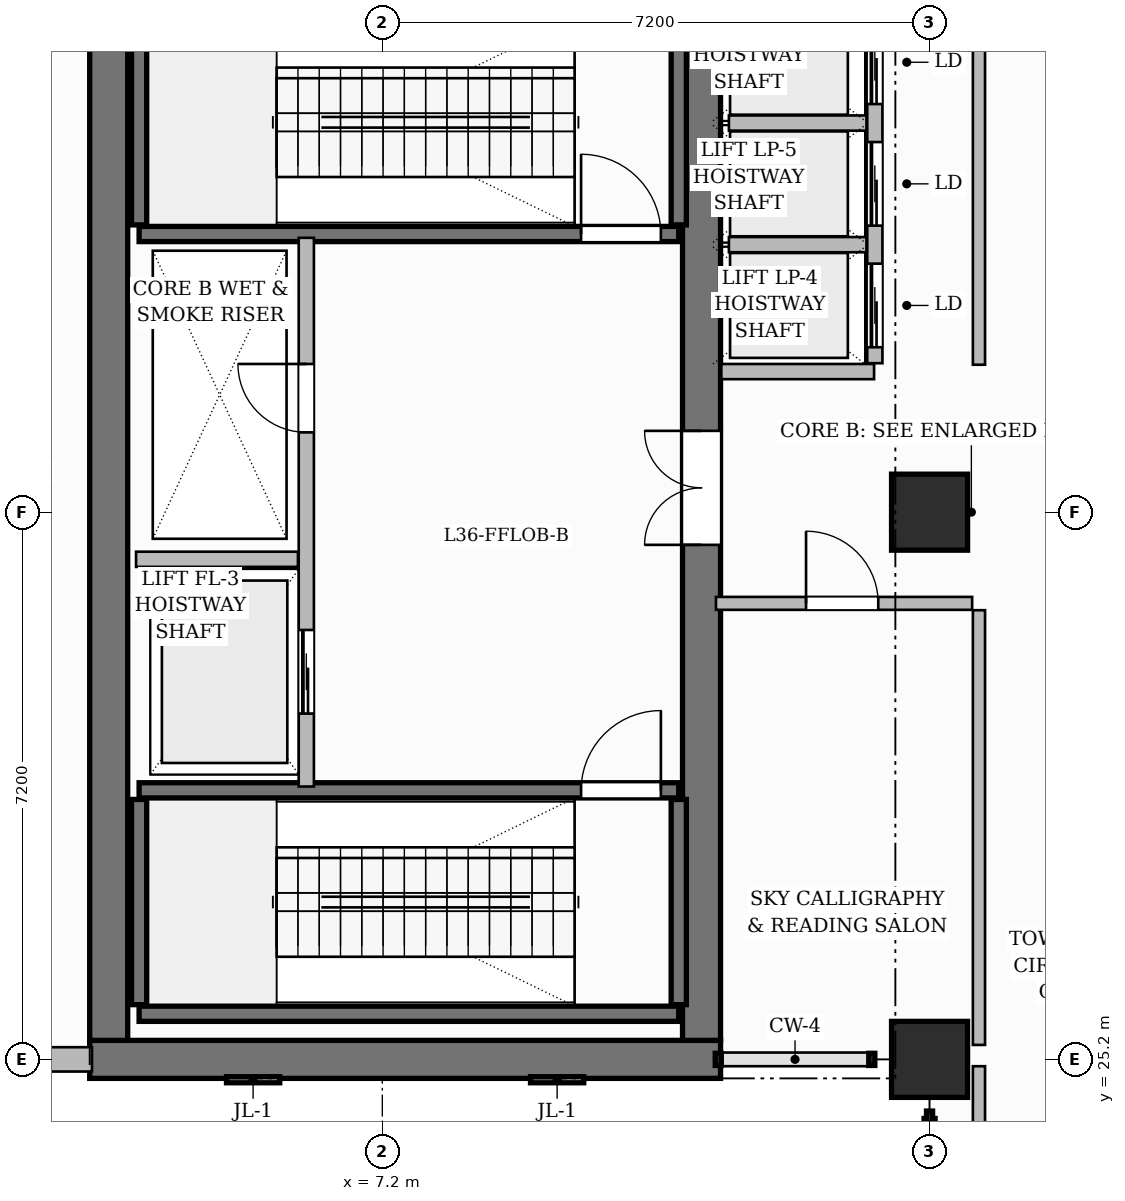
"""IFC4 building model, lengths in metres.
Left out: names, types, materials, properties, quantities, classifications, styles, units other than length and angle.
Written with IfcOpenShell. Run it as: python <this file> out.ifc"""

import sys

from ifc_helpers import new_model, si_unit, direction, frame, frame_2d, origin, origin_2d, place, context, subcontext, project, spatial, rectangle, extrude, source, transform, mapped, element, fill, save


model = new_model("IFC4")
c1 = context("Model", 3, precision=1e-05, world=origin(), true_north=direction((0.0, 1.0)))
c2 = subcontext(c1, "Body", "Model", "MODEL_VIEW")
j1 = project(units=[si_unit("LENGTHUNIT", "METRE"), si_unit("PLANEANGLEUNIT", "RADIAN")], contexts=[c1])
p1 = place(None, origin())
s1 = spatial("IfcSite", under=j1, at=p1, CompositionType="ELEMENT")
p2 = place(p1, origin())
s2 = spatial("IfcBuilding", under=s1, at=p2, CompositionType="ELEMENT")
p3 = place(p2, frame((0.0, 0.0, 145.1)))
s3 = spatial("IfcBuildingStorey", under=s2, at=p3, CompositionType="ELEMENT", Elevation=145.1)
p4 = place(p3, frame((3.35, 25.2, 0.0), z_axis=(0.0, 0.0, 1.0), x_axis=(1.0, 0.0, 0.0)))
e1 = element("IfcWall", 1, at=p4, inside=s3, PredefinedType="SHEAR", context=c2, shape_type="SweptSolid", body=[
    extrude(rectangle(XDim=8.3, YDim=0.5, at=frame_2d((4.15, 0.0))), origin(), (0.0, 0.0, 1.0), 5.2),
])
p5 = place(p3, frame((3.6, 25.45, 0.0), z_axis=(0.0, 0.0, 1.0), x_axis=(0.0, 1.0, 0.0)))
e2 = element("IfcWall", 2, at=p5, inside=s3, PredefinedType="SHEAR", context=c2, shape_type="SweptSolid", body=[
    extrude(rectangle(XDim=13.9, YDim=0.5, at=frame_2d((6.95, 0.0))), origin(), (0.0, 0.0, 1.0), 5.2),
])
p6 = place(p3, frame((11.4, 25.45, 0.0), z_axis=(0.0, 0.0, 1.0), x_axis=(0.0, 1.0, 0.0)))
e3 = element("IfcWall", 3, at=p6, inside=s3, PredefinedType="SHEAR", context=c2, shape_type="SweptSolid", body=[
    extrude(rectangle(XDim=13.9, YDim=0.5, at=frame_2d((6.95, 0.0))), origin(), (0.0, 0.0, 1.0), 5.2),
])
p7 = place(p6, frame((6.52, 0.0, 0.0)))
e4 = element("IfcOpeningElement", 4, at=p7, cuts=e3, PredefinedType="OPENING", context=c2, shape_type="SweptSolid", body=[
    extrude(rectangle(XDim=1.5, YDim=2.2, at=frame_2d((0.75, 1.1))), frame((0.0, 0.26, 0.0), z_axis=(0.0, -1.0, 0.0), x_axis=(1.0, 0.0, 0.0)), (0.0, 0.0, 1.0), 0.52),
])
m1 = source(origin(), c2, "Body", "SweptSolid", [
    extrude(rectangle(XDim=1.0, YDim=1.0, at=origin_2d()), origin(), (0.0, 0.0, 1.0), 5.2),
])
for number, where, z_axis, x_axis in (
    (5, (14.4, 25.2, 0.0), (0.0, 0.0, 1.0), (1.0, 0.0, 0.0)),
    (6, (14.4, 32.4, 0.0), (0.0, 0.0, 1.0), (1.0, 0.0, 0.0)),
):
    element("IfcColumn", number, at=place(p3, frame(where, z_axis=z_axis, x_axis=x_axis)), inside=s3, PredefinedType="COLUMN", context=c2, shape_type="MappedRepresentation", body=[
        mapped(m1, transform((0.0, 0.0, 0.0), scale=1.0)),
    ])
p8 = place(p3, frame((4.0, 25.8, 0.0), z_axis=(0.0, 0.0, 1.0), x_axis=(1.0, 0.0, 0.0)))
e7 = element("IfcWall", 7, at=p8, inside=s3, PredefinedType="SHEAR", context=c2, shape_type="SweptSolid", body=[
    extrude(rectangle(XDim=7.1, YDim=0.2, at=frame_2d((3.55, 0.0))), origin(), (0.0, 0.0, 1.0), 5.2),
])
for number, where, z_axis, x_axis in (
    (8, (4.0, 25.92, 0.0), (0.0, 0.0, 1.0), (0.0, 1.0, 0.0)),
    (9, (11.1, 25.92, 0.0), (0.0, 0.0, 1.0), (0.0, 1.0, 0.0)),
):
    element("IfcWall", number, at=place(p3, frame(where, z_axis=z_axis, x_axis=x_axis)), inside=s3, PredefinedType="SHEAR", context=c2, shape_type="SweptSolid", body=[
        extrude(rectangle(XDim=2.7, YDim=0.2, at=frame_2d((1.35, 0.0))), origin(), (0.0, 0.0, 1.0), 5.2),
    ])
p9 = place(p3, frame((4.0, 28.74, 0.0), z_axis=(0.0, 0.0, 1.0), x_axis=(1.0, 0.0, 0.0)))
e10 = element("IfcWall", 10, at=p9, inside=s3, PredefinedType="SHEAR", context=c2, shape_type="SweptSolid", body=[
    extrude(rectangle(XDim=7.1, YDim=0.2, at=frame_2d((3.55, 0.0))), origin(), (0.0, 0.0, 1.0), 5.2),
])
p10 = place(p9, frame((5.815, 0.0, 0.0)))
e11 = element("IfcOpeningElement", 11, at=p10, cuts=e10, PredefinedType="OPENING", context=c2, shape_type="SweptSolid", body=[
    extrude(rectangle(XDim=1.05, YDim=2.2, at=frame_2d((0.525, 1.1))), frame((0.0, 0.11, 0.0), z_axis=(0.0, -1.0, 0.0), x_axis=(1.0, 0.0, 0.0)), (0.0, 0.0, 1.0), 0.22),
])
for number, where, z_axis, x_axis in (
    (12, (4.0, 36.18, 0.0), (0.0, 0.0, 1.0), (0.0, 1.0, 0.0)),
    (13, (11.1, 36.18, 0.0), (0.0, 0.0, 1.0), (0.0, 1.0, 0.0)),
):
    element("IfcWall", number, at=place(p3, frame(where, z_axis=z_axis, x_axis=x_axis)), inside=s3, PredefinedType="SHEAR", context=c2, shape_type="SweptSolid", body=[
        extrude(rectangle(XDim=2.7, YDim=0.2, at=frame_2d((1.35, 0.0))), origin(), (0.0, 0.0, 1.0), 5.2),
    ])
p11 = place(p3, frame((4.0, 36.06, 0.0), z_axis=(0.0, 0.0, 1.0), x_axis=(1.0, 0.0, 0.0)))
e14 = element("IfcWall", 14, at=p11, inside=s3, PredefinedType="SHEAR", context=c2, shape_type="SweptSolid", body=[
    extrude(rectangle(XDim=7.1, YDim=0.2, at=frame_2d((3.55, 0.0))), origin(), (0.0, 0.0, 1.0), 5.2),
])
p12 = place(p11, frame((5.815, 0.0, 0.0)))
e15 = element("IfcOpeningElement", 15, at=p12, cuts=e14, PredefinedType="OPENING", context=c2, shape_type="SweptSolid", body=[
    extrude(rectangle(XDim=1.05, YDim=2.2, at=frame_2d((0.525, 1.1))), frame((0.0, 0.11, 0.0), z_axis=(0.0, -1.0, 0.0), x_axis=(1.0, 0.0, 0.0)), (0.0, 0.0, 1.0), 0.22),
])
p13 = place(p3, frame((6.2, 28.79, 0.0), z_axis=(0.0, 0.0, 1.0), x_axis=(0.0, 1.0, 0.0)))
e16 = element("IfcWall", 16, at=p13, inside=s3, PredefinedType="PARTITIONING", context=c2, shape_type="SweptSolid", body=[
    extrude(rectangle(XDim=7.22, YDim=0.2, at=frame_2d((3.61, 0.0))), origin(), (0.0, 0.0, 1.0), 4.95),
])
p14 = place(p13, frame((4.66, 0.0, 0.0)))
e17 = element("IfcOpeningElement", 17, at=p14, cuts=e16, PredefinedType="OPENING", context=c2, shape_type="SweptSolid", body=[
    extrude(rectangle(XDim=0.9, YDim=2.1, at=frame_2d((0.45, 1.05))), frame((0.0, 0.11, 0.0), z_axis=(0.0, -1.0, 0.0), x_axis=(1.0, 0.0, 0.0)), (0.0, 0.0, 1.0), 0.22),
])
p15 = place(p13, frame((0.96, 0.0, 0.0)))
e18 = element("IfcOpeningElement", 18, at=p15, cuts=e16, PredefinedType="OPENING", context=c2, shape_type="SweptSolid", body=[
    extrude(rectangle(XDim=1.1, YDim=2.2, at=frame_2d((0.55, 1.1))), frame((0.0, 0.11, 0.0), z_axis=(0.0, -1.0, 0.0), x_axis=(1.0, 0.0, 0.0)), (0.0, 0.0, 1.0), 0.22),
])
p16 = place(p3, frame((3.96, 31.78, 0.0), z_axis=(0.0, 0.0, 1.0), x_axis=(1.0, 0.0, 0.0)))
e19 = element("IfcWall", 19, at=p16, inside=s3, PredefinedType="PARTITIONING", context=c2, shape_type="SweptSolid", body=[
    extrude(rectangle(XDim=2.13, YDim=0.2, at=frame_2d((1.065, 0.0))), origin(), (0.0, 0.0, 1.0), 4.95),
])
p17 = place(p3, frame((11.66, 34.25, 0.0), z_axis=(0.0, 0.0, 1.0), x_axis=(1.0, 0.0, 0.0)))
e20 = element("IfcWall", 20, at=p17, inside=s3, PredefinedType="PARTITIONING", context=c2, shape_type="SweptSolid", body=[
    extrude(rectangle(XDim=2.01, YDim=0.2, at=frame_2d((1.005, 0.0))), origin(), (0.0, 0.0, 1.0), 4.95),
])
p18 = place(p3, frame((13.68, 34.36, 0.0), z_axis=(0.0, 0.0, 1.0), x_axis=(0.0, 1.0, 0.0)))
e21 = element("IfcWall", 21, at=p18, inside=s3, PredefinedType="PARTITIONING", context=c2, shape_type="SweptSolid", body=[
    extrude(rectangle(XDim=4.72, YDim=0.2, at=frame_2d((2.36, 0.0))), origin(), (0.0, 0.0, 1.0), 4.95),
])
p19 = place(p18, frame((0.21, 0.0, 0.0)))
e22 = element("IfcOpeningElement", 22, at=p19, cuts=e21, PredefinedType="OPENING", context=c2, shape_type="SweptSolid", body=[
    extrude(rectangle(XDim=1.1, YDim=2.2, at=frame_2d((0.55, 1.1))), frame((0.0, 0.11, 0.0), z_axis=(0.0, -1.0, 0.0), x_axis=(1.0, 0.0, 0.0)), (0.0, 0.0, 1.0), 0.22),
])
p20 = place(p18, frame((1.81, 0.0, 0.0)))
e23 = element("IfcOpeningElement", 23, at=p20, cuts=e21, PredefinedType="OPENING", context=c2, shape_type="SweptSolid", body=[
    extrude(rectangle(XDim=1.1, YDim=2.2, at=frame_2d((0.55, 1.1))), frame((0.0, 0.11, 0.0), z_axis=(0.0, -1.0, 0.0), x_axis=(1.0, 0.0, 0.0)), (0.0, 0.0, 1.0), 0.22),
])
p21 = place(p18, frame((3.41, 0.0, 0.0)))
e24 = element("IfcOpeningElement", 24, at=p21, cuts=e21, PredefinedType="OPENING", context=c2, shape_type="SweptSolid", body=[
    extrude(rectangle(XDim=1.1, YDim=2.2, at=frame_2d((0.55, 1.1))), frame((0.0, 0.11, 0.0), z_axis=(0.0, -1.0, 0.0), x_axis=(1.0, 0.0, 0.0)), (0.0, 0.0, 1.0), 0.22),
])
for number, where, z_axis, x_axis in (
    (25, (11.76, 35.92, 0.0), (0.0, 0.0, 1.0), (1.0, 0.0, 0.0)),
    (26, (11.76, 37.52, 0.0), (0.0, 0.0, 1.0), (1.0, 0.0, 0.0)),
):
    element("IfcWall", number, at=place(p3, frame(where, z_axis=z_axis, x_axis=x_axis)), inside=s3, PredefinedType="PARTITIONING", context=c2, shape_type="SweptSolid", body=[
        extrude(rectangle(XDim=1.81, YDim=0.2, at=frame_2d((0.905, 0.0))), origin(), (0.0, 0.0, 1.0), 4.95),
    ])
p22 = place(p3, frame((15.05, 11.36, 0.0), z_axis=(0.0, 0.0, 1.0), x_axis=(0.0, 1.0, 0.0)))
e27 = element("IfcWall", 27, at=p22, inside=s3, PredefinedType="PARTITIONING", context=c2, shape_type="SweptSolid", body=[
    extrude(rectangle(XDim=13.75, YDim=0.16, at=frame_2d((6.875, 0.0))), origin(), (0.0, 0.0, 1.0), 4.95),
])
p23 = place(p3, frame((15.05, 34.34, 0.0), z_axis=(0.0, 0.0, 1.0), x_axis=(0.0, 1.0, 0.0)))
e28 = element("IfcWall", 28, at=p23, inside=s3, PredefinedType="PARTITIONING", context=c2, shape_type="SweptSolid", body=[
    extrude(rectangle(XDim=12.292, YDim=0.16, at=frame_2d((6.146, 0.0))), origin(), (0.0, 0.0, 1.0), 4.95),
])
p24 = place(p23, frame((6.535, 0.0, 0.0)))
e29 = element("IfcOpeningElement", 29, at=p24, cuts=e28, PredefinedType="OPENING", context=c2, shape_type="SweptSolid", body=[
    extrude(rectangle(XDim=1.05, YDim=2.25, at=frame_2d((0.525, 1.125))), frame((0.0, 0.09, 0.0), z_axis=(0.0, -1.0, 0.0), x_axis=(1.0, 0.0, 0.0)), (0.0, 0.0, 1.0), 0.18),
])
p25 = place(p23, frame((10.06, 0.0, 0.0)))
e30 = element("IfcOpeningElement", 30, at=p25, cuts=e28, PredefinedType="OPENING", context=c2, shape_type="SweptSolid", body=[
    extrude(rectangle(XDim=1.0, YDim=2.2, at=frame_2d((0.5, 1.1))), frame((0.0, 0.09, 0.0), z_axis=(0.0, -1.0, 0.0), x_axis=(1.0, 0.0, 0.0)), (0.0, 0.0, 1.0), 0.18),
])
p26 = place(p3, frame((15.05, 25.39, 0.0), z_axis=(0.0, 0.0, 1.0), x_axis=(0.0, 1.0, 0.0)))
e31 = element("IfcWall", 31, at=p26, inside=s3, PredefinedType="PARTITIONING", context=c2, shape_type="SweptSolid", body=[
    extrude(rectangle(XDim=5.72, YDim=0.16, at=frame_2d((2.86, 0.0))), origin(), (0.0, 0.0, 1.0), 4.95),
])
p27 = place(p3, frame((11.59, 31.2, 0.0), z_axis=(0.0, 0.0, 1.0), x_axis=(1.0, 0.0, 0.0)))
e32 = element("IfcWall", 32, at=p27, inside=s3, PredefinedType="PARTITIONING", context=c2, shape_type="SweptSolid", body=[
    extrude(rectangle(XDim=3.37, YDim=0.17, at=frame_2d((1.685, 0.0))), origin(), (0.0, 0.0, 1.0), 4.95),
])
p28 = place(p27, frame((1.185, 0.0, 0.0)))
e33 = element("IfcOpeningElement", 33, at=p28, cuts=e32, PredefinedType="OPENING", context=c2, shape_type="SweptSolid", body=[
    extrude(rectangle(XDim=0.95, YDim=2.15, at=frame_2d((0.475, 1.075))), frame((0.0, 0.095, 0.0), z_axis=(0.0, -1.0, 0.0), x_axis=(1.0, 0.0, 0.0)), (0.0, 0.0, 1.0), 0.19),
])
p29 = place(p3, frame((0.0, 25.2, 0.0), z_axis=(0.0, 0.0, 1.0), x_axis=(1.0, 0.0, 0.0)))
e34 = element("IfcWall", 34, at=p29, inside=s3, PredefinedType="SOLIDWALL", context=c2, shape_type="SweptSolid", body=[
    extrude(rectangle(XDim=3.38, YDim=0.32, at=frame_2d((1.69, 0.0))), origin(), (0.0, 0.0, 1.0), 4.95),
])
p30 = place(p29, frame((1.205, 0.0, 0.8)))
e35 = element("IfcOpeningElement", 35, at=p30, cuts=e34, PredefinedType="OPENING", context=c2, shape_type="SweptSolid", body=[
    extrude(rectangle(XDim=1.4, YDim=1.85, at=frame_2d((0.7, 0.925))), frame((0.0, 0.17, 0.0), z_axis=(0.0, -1.0, 0.0), x_axis=(1.0, 0.0, 0.0)), (0.0, 0.0, 1.0), 0.34),
])
m2 = source(origin(), c2, "Body", "SweptSolid", [
    extrude(rectangle(XDim=1.05, YDim=2.2, at=frame_2d((0.525, 1.1))), frame((0.0, 0.025, 0.0), z_axis=(0.0, -1.0, 0.0), x_axis=(1.0, 0.0, 0.0)), (0.0, 0.0, 1.0), 0.05),
])
p31 = place(p10, origin())
e36 = element("IfcDoor", 36, at=p31, inside=s3, OperationType="SINGLE_SWING_RIGHT", PredefinedType="DOOR", context=c2, shape_type="MappedRepresentation", body=[
    mapped(m2, transform((0.0, 0.0, 0.0), scale=1.0)),
])
fill(e11, e36)
p32 = place(p12, origin())
e37 = element("IfcDoor", 37, at=p32, inside=s3, OperationType="SINGLE_SWING_LEFT", PredefinedType="DOOR", context=c2, shape_type="MappedRepresentation", body=[
    mapped(m2, transform((0.0, 0.0, 0.0), scale=1.0)),
])
fill(e15, e37)
m3 = source(origin(), c2, "Body", "SweptSolid", [
    extrude(rectangle(XDim=0.9, YDim=2.1, at=frame_2d((0.45, 1.05))), frame((0.0, 0.025, 0.0), z_axis=(0.0, -1.0, 0.0), x_axis=(1.0, 0.0, 0.0)), (0.0, 0.0, 1.0), 0.05),
])
p33 = place(p14, origin())
e38 = element("IfcDoor", 38, at=p33, inside=s3, OperationType="SINGLE_SWING_RIGHT", PredefinedType="DOOR", context=c2, shape_type="MappedRepresentation", body=[
    mapped(m3, transform((0.0, 0.0, 0.0), scale=1.0)),
])
fill(e17, e38)
m4 = source(origin(), c2, "Body", "SweptSolid", [
    extrude(rectangle(XDim=1.5, YDim=2.2, at=frame_2d((0.75, 1.1))), frame((0.0, 0.025, 0.0), z_axis=(0.0, -1.0, 0.0), x_axis=(1.0, 0.0, 0.0)), (0.0, 0.0, 1.0), 0.05),
])
p34 = place(p7, origin())
e39 = element("IfcDoor", 39, at=p34, inside=s3, OperationType="DOUBLE_DOOR_SINGLE_SWING", PredefinedType="DOOR", context=c2, shape_type="MappedRepresentation", body=[
    mapped(m4, transform((0.0, 0.0, 0.0), scale=1.0)),
])
fill(e4, e39)
m5 = source(origin(), c2, "Body", "SweptSolid", [
    extrude(rectangle(XDim=0.95, YDim=2.15, at=frame_2d((0.475, 1.075))), frame((0.0, 0.025, 0.0), z_axis=(0.0, -1.0, 0.0), x_axis=(1.0, 0.0, 0.0)), (0.0, 0.0, 1.0), 0.05),
])
p35 = place(p28, origin())
e40 = element("IfcDoor", 40, at=p35, inside=s3, OperationType="SINGLE_SWING_LEFT", PredefinedType="DOOR", context=c2, shape_type="MappedRepresentation", body=[
    mapped(m5, transform((0.0, 0.0, 0.0), scale=1.0)),
])
fill(e33, e40)
m6 = source(origin(), c2, "Body", "SweptSolid", [
    extrude(rectangle(XDim=1.1, YDim=2.2, at=frame_2d((0.55, 1.1))), frame((0.0, 0.025, 0.0), z_axis=(0.0, -1.0, 0.0), x_axis=(1.0, 0.0, 0.0)), (0.0, 0.0, 1.0), 0.05),
])
p36 = place(p15, origin())
e41 = element("IfcDoor", 41, at=p36, inside=s3, OperationType="SLIDING_TO_LEFT", PredefinedType="DOOR", context=c2, shape_type="MappedRepresentation", body=[
    mapped(m6, transform((0.0, 0.0, 0.0), scale=1.0)),
])
fill(e18, e41)
p37 = place(p19, origin())
e42 = element("IfcDoor", 42, at=p37, inside=s3, OperationType="SLIDING_TO_LEFT", PredefinedType="DOOR", context=c2, shape_type="MappedRepresentation", body=[
    mapped(m6, transform((0.0, 0.0, 0.0), scale=1.0)),
])
fill(e22, e42)
p38 = place(p20, origin())
e43 = element("IfcDoor", 43, at=p38, inside=s3, OperationType="SLIDING_TO_LEFT", PredefinedType="DOOR", context=c2, shape_type="MappedRepresentation", body=[
    mapped(m6, transform((0.0, 0.0, 0.0), scale=1.0)),
])
fill(e23, e43)
p39 = place(p21, origin())
e44 = element("IfcDoor", 44, at=p39, inside=s3, OperationType="SLIDING_TO_LEFT", PredefinedType="DOOR", context=c2, shape_type="MappedRepresentation", body=[
    mapped(m6, transform((0.0, 0.0, 0.0), scale=1.0)),
])
fill(e24, e44)
save(model, sys.argv[1])
